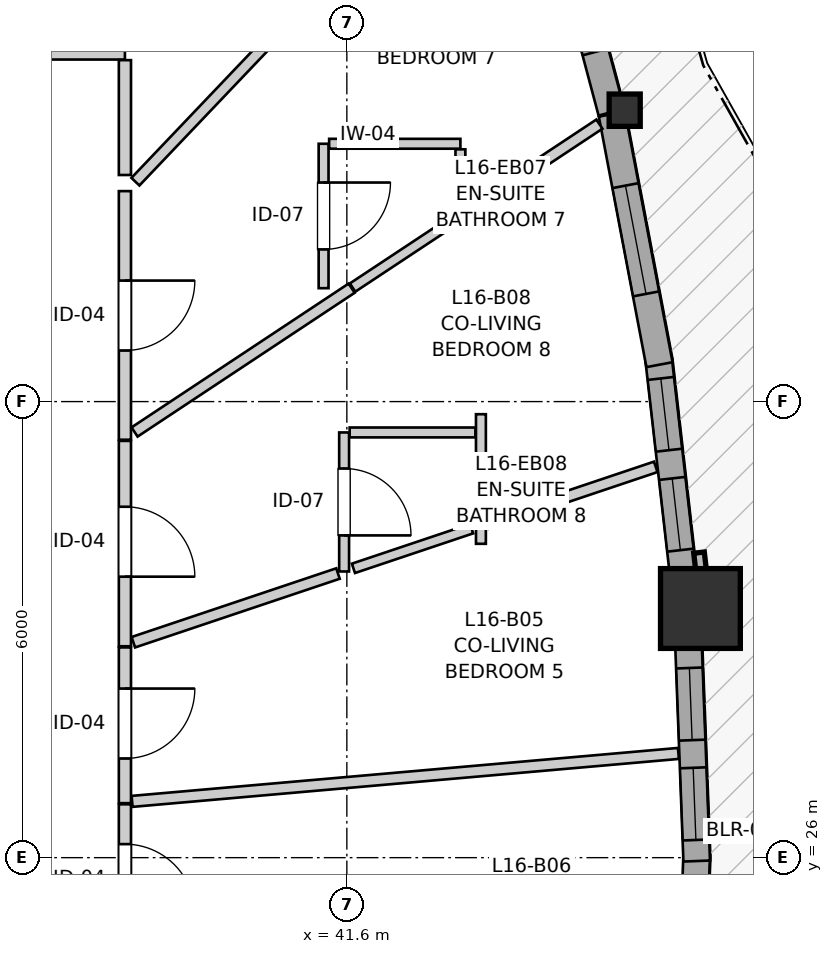
"""IFC4 building model, lengths in metres.
Left out: names, types, materials, properties, quantities, classifications, styles, units other than length and angle.
Written with IfcOpenShell. Run it as: python <this file> out.ifc"""

import sys

from ifc_helpers import new_model, si_unit, direction, frame, frame_2d, origin, origin_2d, place, context, subcontext, project, spatial, rectangle, i_section, extrude, source, transform, mapped, element, fill, save


model = new_model("IFC4")
c1 = context("Model", 3, precision=1e-05, world=origin(), true_north=direction((0.0, 1.0)))
c2 = subcontext(c1, "Body", "Model", "MODEL_VIEW")
j1 = project(units=[si_unit("LENGTHUNIT", "METRE"), si_unit("PLANEANGLEUNIT", "RADIAN")], contexts=[c1])
p1 = place(None, origin())
s1 = spatial("IfcSite", under=j1, at=p1, CompositionType="ELEMENT")
p2 = place(p1, origin())
s2 = spatial("IfcBuilding", under=s1, at=p2, CompositionType="ELEMENT")
p3 = place(p2, frame((0.0, 0.0, 55.8)))
s3 = spatial("IfcBuildingStorey", under=s2, at=p3, CompositionType="ELEMENT", Elevation=55.8)
m1 = source(origin(), c2, "Body", "SweptSolid", [
    extrude(rectangle(XDim=1.05, YDim=1.05, at=origin_2d()), origin(), (0.0, 0.0, 1.0), 2.94),
])
p4 = place(p3, frame((46.252, 29.278, 0.0), z_axis=(0.0, 0.0, 1.0), x_axis=(1.0, 0.0, 0.0)))
e1 = element("IfcColumn", 1, at=p4, inside=s3, PredefinedType="COLUMN", context=c2, shape_type="MappedRepresentation", body=[
    mapped(m1, transform((0.0, 0.0, 0.0), x_axis=(1.0, 0.0, 0.0), y_axis=(0.0, 1.0, 0.0), z_axis=(0.0, 0.0, 1.0), scale=1.0)),
])
m2 = source(origin(), c2, "Body", "SweptSolid", [
    extrude(i_section(OverallWidth=0.409, OverallDepth=0.425, WebThickness=0.03, FlangeThickness=0.048, FilletRadius=0.015, at=origin_2d()), origin(), (0.0, 0.0, 1.0), 2.94),
])
p5 = place(p3, frame((45.256, 35.834, 0.0), z_axis=(0.0, 0.0, 1.0), x_axis=(1.0, 0.0, 0.0)))
e2 = element("IfcColumn", 2, at=p5, inside=s3, PredefinedType="PILASTER", context=c2, shape_type="MappedRepresentation", body=[
    mapped(m2, transform((0.0, 0.0, 0.0), x_axis=(1.0, 0.0, 0.0), y_axis=(0.0, 1.0, 0.0), z_axis=(0.0, 0.0, 1.0), scale=1.0)),
])
p6 = place(p3, frame((46.078, 22.749, 0.0), z_axis=(0.0, 0.0, 1.0), x_axis=(0.037972593677, 0.999278780986, 0.0)))
e3 = element("IfcWall", 3, at=p6, inside=s3, PredefinedType="SOLIDWALL", context=c2, shape_type="SweptSolid", body=[
    extrude(rectangle(XDim=3.298, YDim=0.35, at=frame_2d((1.649, 0.0))), origin(), (0.0, 0.0, 1.0), 2.42),
])
p7 = place(p6, frame((1.394, 0.0, 0.82)))
e4 = element("IfcOpeningElement", 4, at=p7, cuts=e3, PredefinedType="OPENING", context=c2, shape_type="SweptSolid", body=[
    extrude(rectangle(XDim=1.25, YDim=1.35, at=frame_2d((0.625, 0.675))), frame((0.0, 0.185, 0.0), z_axis=(0.0, -1.0, 0.0), x_axis=(1.0, 0.0, 0.0)), (0.0, 0.0, 1.0), 0.37),
])
p8 = place(p3, frame((46.203, 25.955, 0.0), z_axis=(0.0, 0.0, 1.0), x_axis=(-0.038016855762, 0.999277098045, 0.0)))
e5 = element("IfcWall", 5, at=p8, inside=s3, PredefinedType="SOLIDWALL", context=c2, shape_type="SweptSolid", body=[
    extrude(rectangle(XDim=3.018, YDim=0.35, at=frame_2d((1.509, 0.0))), origin(), (0.0, 0.0, 1.0), 2.42),
])
p9 = place(p8, frame((0.277, 0.0, 0.82)))
e6 = element("IfcOpeningElement", 6, at=p9, cuts=e5, PredefinedType="OPENING", context=c2, shape_type="SweptSolid", body=[
    extrude(rectangle(XDim=0.95, YDim=1.35, at=frame_2d((0.475, 0.675))), frame((0.0, 0.185, 0.0), z_axis=(0.0, -1.0, 0.0), x_axis=(1.0, 0.0, 0.0)), (0.0, 0.0, 1.0), 0.37),
])
p10 = place(p8, frame((1.592, 0.0, 0.82)))
e7 = element("IfcOpeningElement", 7, at=p10, cuts=e5, PredefinedType="OPENING", context=c2, shape_type="SweptSolid", body=[
    extrude(rectangle(XDim=0.95, YDim=1.35, at=frame_2d((0.475, 0.675))), frame((0.0, 0.185, 0.0), z_axis=(0.0, -1.0, 0.0), x_axis=(1.0, 0.0, 0.0)), (0.0, 0.0, 1.0), 0.37),
])
p11 = place(p3, frame((46.044, 29.556, 0.0), z_axis=(0.0, 0.0, 1.0), x_axis=(-0.113263196818, 0.993565019637, 0.0)))
e8 = element("IfcWall", 8, at=p11, inside=s3, PredefinedType="SOLIDWALL", context=c2, shape_type="SweptSolid", body=[
    extrude(rectangle(XDim=3.037, YDim=0.35, at=frame_2d((1.519, 0.0))), origin(), (0.0, 0.0, 1.0), 2.42),
])
p12 = place(p11, frame((0.492, 0.0, 0.82)))
e9 = element("IfcOpeningElement", 9, at=p12, cuts=e8, PredefinedType="OPENING", context=c2, shape_type="SweptSolid", body=[
    extrude(rectangle(XDim=0.95, YDim=1.35, at=frame_2d((0.475, 0.675))), frame((0.0, 0.185, 0.0), z_axis=(0.0, -1.0, 0.0), x_axis=(1.0, 0.0, 0.0)), (0.0, 0.0, 1.0), 0.37),
])
p13 = place(p11, frame((1.816, 0.0, 0.82)))
e10 = element("IfcOpeningElement", 10, at=p13, cuts=e8, PredefinedType="OPENING", context=c2, shape_type="SweptSolid", body=[
    extrude(rectangle(XDim=0.95, YDim=1.35, at=frame_2d((0.475, 0.675))), frame((0.0, 0.185, 0.0), z_axis=(0.0, -1.0, 0.0), x_axis=(1.0, 0.0, 0.0)), (0.0, 0.0, 1.0), 0.37),
])
p14 = place(p3, frame((45.713, 32.486, 0.0), z_axis=(0.0, 0.0, 1.0), x_axis=(-0.186603748992, 0.982435260392, 0.0)))
e11 = element("IfcWall", 11, at=p14, inside=s3, PredefinedType="SOLIDWALL", context=c2, shape_type="SweptSolid", body=[
    extrude(rectangle(XDim=3.354, YDim=0.35, at=frame_2d((1.677, 0.0))), origin(), (0.0, 0.0, 1.0), 2.42),
])
p15 = place(p14, frame((0.948, 0.0, 0.82)))
e12 = element("IfcOpeningElement", 12, at=p15, cuts=e11, PredefinedType="OPENING", context=c2, shape_type="SweptSolid", body=[
    extrude(rectangle(XDim=1.45, YDim=1.25, at=frame_2d((0.725, 0.625))), frame((0.0, 0.185, 0.0), z_axis=(0.0, -1.0, 0.0), x_axis=(1.0, 0.0, 0.0)), (0.0, 0.0, 1.0), 0.37),
])
p16 = place(p3, frame((45.081, 35.808, 0.0), z_axis=(0.0, 0.0, 1.0), x_axis=(-0.257114470429, 0.966380954436, 0.0)))
e13 = element("IfcWall", 13, at=p16, inside=s3, PredefinedType="SOLIDWALL", context=c2, shape_type="SweptSolid", body=[
    extrude(rectangle(XDim=3.41, YDim=0.35, at=frame_2d((1.705, 0.0))), origin(), (0.0, 0.0, 1.0), 2.42),
])
p17 = place(p16, frame((0.82, 0.0, 0.82)))
e14 = element("IfcOpeningElement", 14, at=p17, cuts=e13, PredefinedType="OPENING", context=c2, shape_type="SweptSolid", body=[
    extrude(rectangle(XDim=1.75, YDim=1.3, at=frame_2d((0.875, 0.65))), frame((0.0, 0.185, 0.0), z_axis=(0.0, -1.0, 0.0), x_axis=(1.0, 0.0, 0.0)), (0.0, 0.0, 1.0), 0.37),
])
p18 = place(p3, frame((35.011, 36.58, 0.0), z_axis=(0.0, 0.0, 1.0), x_axis=(1.0, 0.0, 0.0)))
e15 = element("IfcWall", 15, at=p18, inside=s3, PredefinedType="PARTITIONING", context=c2, shape_type="SweptSolid", body=[
    extrude(rectangle(XDim=3.669, YDim=0.16, at=frame_2d((1.834, 0.0))), origin(), (0.0, 0.0, 1.0), 2.94),
])
p19 = place(p18, frame((1.363, 0.0, 0.0)))
e16 = element("IfcOpeningElement", 16, at=p19, cuts=e15, PredefinedType="OPENING", context=c2, shape_type="SweptSolid", body=[
    extrude(rectangle(XDim=0.96, YDim=2.1, at=frame_2d((0.48, 1.05))), frame((0.0, 0.09, 0.0), z_axis=(0.0, -1.0, 0.0), x_axis=(1.0, 0.0, 0.0)), (0.0, 0.0, 1.0), 0.18),
])
p20 = place(p3, frame((38.68, 34.769, 0.0), z_axis=(0.0, 0.0, 1.0), x_axis=(0.0, -1.0, 0.0)))
e17 = element("IfcWall", 17, at=p20, inside=s3, PredefinedType="PARTITIONING", context=c2, shape_type="SweptSolid", body=[
    extrude(rectangle(XDim=3.271, YDim=0.16, at=frame_2d((1.635, 0.0))), origin(), (0.0, 0.0, 1.0), 2.94),
])
p21 = place(p20, frame((1.177, 0.0, 0.0)))
e18 = element("IfcOpeningElement", 18, at=p21, cuts=e17, PredefinedType="OPENING", context=c2, shape_type="SweptSolid", body=[
    extrude(rectangle(XDim=0.92, YDim=2.1, at=frame_2d((0.46, 1.05))), frame((0.0, 0.09, 0.0), z_axis=(0.0, -1.0, 0.0), x_axis=(1.0, 0.0, 0.0)), (0.0, 0.0, 1.0), 0.18),
])
p22 = place(p3, frame((38.68, 31.483, 0.0), z_axis=(0.0, 0.0, 1.0), x_axis=(0.0, -1.0, 0.0)))
e19 = element("IfcWall", 19, at=p22, inside=s3, PredefinedType="PARTITIONING", context=c2, shape_type="SweptSolid", body=[
    extrude(rectangle(XDim=2.702, YDim=0.16, at=frame_2d((1.351, 0.0))), origin(), (0.0, 0.0, 1.0), 2.94),
])
p23 = place(p22, frame((0.866, 0.0, 0.0)))
e20 = element("IfcOpeningElement", 20, at=p23, cuts=e19, PredefinedType="OPENING", context=c2, shape_type="SweptSolid", body=[
    extrude(rectangle(XDim=0.92, YDim=2.1, at=frame_2d((0.46, 1.05))), frame((0.0, 0.09, 0.0), z_axis=(0.0, -1.0, 0.0), x_axis=(1.0, 0.0, 0.0)), (0.0, 0.0, 1.0), 0.18),
])
p24 = place(p3, frame((38.68, 28.766, 0.0), z_axis=(0.0, 0.0, 1.0), x_axis=(0.0, -1.0, 0.0)))
e21 = element("IfcWall", 21, at=p24, inside=s3, PredefinedType="PARTITIONING", context=c2, shape_type="SweptSolid", body=[
    extrude(rectangle(XDim=2.049, YDim=0.16, at=frame_2d((1.024, 0.0))), origin(), (0.0, 0.0, 1.0), 2.94),
])
p25 = place(p24, frame((0.542, 0.0, 0.0)))
e22 = element("IfcOpeningElement", 22, at=p25, cuts=e21, PredefinedType="OPENING", context=c2, shape_type="SweptSolid", body=[
    extrude(rectangle(XDim=0.92, YDim=2.1, at=frame_2d((0.46, 1.05))), frame((0.0, 0.09, 0.0), z_axis=(0.0, -1.0, 0.0), x_axis=(1.0, 0.0, 0.0)), (0.0, 0.0, 1.0), 0.18),
])
p26 = place(p3, frame((38.68, 26.702, 0.0), z_axis=(0.0, 0.0, 1.0), x_axis=(0.0, -1.0, 0.0)))
e23 = element("IfcWall", 23, at=p26, inside=s3, PredefinedType="PARTITIONING", context=c2, shape_type="SweptSolid", body=[
    extrude(rectangle(XDim=1.967, YDim=0.16, at=frame_2d((0.983, 0.0))), origin(), (0.0, 0.0, 1.0), 2.94),
])
p27 = place(p26, frame((0.524, 0.0, 0.0)))
e24 = element("IfcOpeningElement", 24, at=p27, cuts=e23, PredefinedType="OPENING", context=c2, shape_type="SweptSolid", body=[
    extrude(rectangle(XDim=0.92, YDim=2.1, at=frame_2d((0.46, 1.05))), frame((0.0, 0.09, 0.0), z_axis=(0.0, -1.0, 0.0), x_axis=(1.0, 0.0, 0.0)), (0.0, 0.0, 1.0), 0.18),
])
p28 = place(p3, frame((41.294, 35.392, 0.0), z_axis=(0.0, 0.0, 1.0), x_axis=(0.0, -1.0, 0.0)))
e25 = element("IfcWall", 25, at=p28, inside=s3, PredefinedType="PARTITIONING", context=c2, shape_type="SweptSolid", body=[
    extrude(rectangle(XDim=1.9, YDim=0.13, at=frame_2d((0.95, 0.0))), origin(), (0.0, 0.0, 1.0), 2.94),
])
p29 = place(p28, frame((0.51, 0.0, 0.0)))
e26 = element("IfcOpeningElement", 26, at=p29, cuts=e25, PredefinedType="OPENING", context=c2, shape_type="SweptSolid", body=[
    extrude(rectangle(XDim=0.88, YDim=2.05, at=frame_2d((0.44, 1.025))), frame((0.0, 0.075, 0.0), z_axis=(0.0, -1.0, 0.0), x_axis=(1.0, 0.0, 0.0)), (0.0, 0.0, 1.0), 0.15),
])
p30 = place(p3, frame((41.564, 31.594, 0.0), z_axis=(0.0, 0.0, 1.0), x_axis=(0.0, -1.0, 0.0)))
e27 = element("IfcWall", 27, at=p30, inside=s3, PredefinedType="PARTITIONING", context=c2, shape_type="SweptSolid", body=[
    extrude(rectangle(XDim=1.829, YDim=0.13, at=frame_2d((0.915, 0.0))), origin(), (0.0, 0.0, 1.0), 2.94),
])
p31 = place(p30, frame((0.475, 0.0, 0.0)))
e28 = element("IfcOpeningElement", 28, at=p31, cuts=e27, PredefinedType="OPENING", context=c2, shape_type="SweptSolid", body=[
    extrude(rectangle(XDim=0.88, YDim=2.05, at=frame_2d((0.44, 1.025))), frame((0.0, 0.075, 0.0), z_axis=(0.0, -1.0, 0.0), x_axis=(1.0, 0.0, 0.0)), (0.0, 0.0, 1.0), 0.15),
])
p32 = place(p3, frame((38.774, 26.74, 0.0), z_axis=(0.0, 0.0, 1.0), x_axis=(0.99617095107, 0.087426747871, 0.0)))
e29 = element("IfcWall", 29, at=p32, inside=s3, PredefinedType="PARTITIONING", context=c2, shape_type="SweptSolid", body=[
    extrude(rectangle(XDim=7.216, YDim=0.145, at=frame_2d((3.608, 0.0))), origin(), (0.0, 0.0, 1.0), 2.94),
])
p33 = place(p3, frame((38.818, 34.893, 0.0), z_axis=(0.0, 0.0, 1.0), x_axis=(0.68961378572, 0.724177344678, 0.0)))
e30 = element("IfcWall", 30, at=p33, inside=s3, PredefinedType="PARTITIONING", context=c2, shape_type="SweptSolid", body=[
    extrude(rectangle(XDim=7.071, YDim=0.145, at=frame_2d((3.535, 0.0))), origin(), (0.0, 0.0, 1.0), 2.94),
])
p34 = place(p3, frame((38.807, 31.6, 0.0), z_axis=(0.0, 0.0, 1.0), x_axis=(0.833690999351, 0.552231217518, 0.0)))
e31 = element("IfcWall", 31, at=p34, inside=s3, PredefinedType="PARTITIONING", context=c2, shape_type="SweptSolid", body=[
    extrude(rectangle(XDim=3.426, YDim=0.145, at=frame_2d((1.713, 0.0))), origin(), (0.0, 0.0, 1.0), 2.94),
])
p35 = place(p3, frame((38.791, 28.834, 0.0), z_axis=(0.0, 0.0, 1.0), x_axis=(0.94801935148, 0.318212679226, 0.0)))
e32 = element("IfcWall", 32, at=p35, inside=s3, PredefinedType="PARTITIONING", context=c2, shape_type="SweptSolid", body=[
    extrude(rectangle(XDim=2.84, YDim=0.145, at=frame_2d((1.42, 0.0))), origin(), (0.0, 0.0, 1.0), 2.94),
])
p36 = place(p3, frame((43.445, 30.396, 0.0), z_axis=(0.0, 0.0, 1.0), x_axis=(0.947971837268, 0.318354198568, 0.0)))
e33 = element("IfcWall", 33, at=p36, inside=s3, PredefinedType="PARTITIONING", context=c2, shape_type="SweptSolid", body=[
    extrude(rectangle(XDim=2.341, YDim=0.145, at=frame_2d((1.171, 0.0))), origin(), (0.0, 0.0, 1.0), 2.94),
])
p37 = place(p3, frame((43.094, 34.439, 0.0), z_axis=(0.0, 0.0, 1.0), x_axis=(0.833690342454, 0.552232209219, 0.0)))
e34 = element("IfcWall", 34, at=p37, inside=s3, PredefinedType="PARTITIONING", context=c2, shape_type="SweptSolid", body=[
    extrude(rectangle(XDim=2.194, YDim=0.145, at=frame_2d((1.097, 0.0))), origin(), (0.0, 0.0, 1.0), 2.94),
])
p38 = place(p3, frame((41.687, 29.806, 0.0), z_axis=(0.0, 0.0, 1.0), x_axis=(0.948056253842, 0.318102718553, 0.0)))
e35 = element("IfcWall", 35, at=p38, inside=s3, PredefinedType="PARTITIONING", context=c2, shape_type="SweptSolid", body=[
    extrude(rectangle(XDim=1.64, YDim=0.13, at=frame_2d((0.82, 0.0))), origin(), (0.0, 0.0, 1.0), 2.94),
])
p39 = place(p3, frame((41.367, 35.392, 0.0), z_axis=(0.0, 0.0, 1.0), x_axis=(1.0, 0.0, 0.0)))
e36 = element("IfcWall", 36, at=p39, inside=s3, PredefinedType="PARTITIONING", context=c2, shape_type="SweptSolid", body=[
    extrude(rectangle(XDim=1.727, YDim=0.13, at=frame_2d((0.864, 0.0))), origin(), (0.0, 0.0, 1.0), 2.94),
])
p40 = place(p3, frame((41.637, 31.594, 0.0), z_axis=(0.0, 0.0, 1.0), x_axis=(1.0, 0.0, 0.0)))
e37 = element("IfcWall", 37, at=p40, inside=s3, PredefinedType="PARTITIONING", context=c2, shape_type="SweptSolid", body=[
    extrude(rectangle(XDim=1.654, YDim=0.13, at=frame_2d((0.827, 0.0))), origin(), (0.0, 0.0, 1.0), 2.94),
])
p41 = place(p3, frame((38.68, 34.981, 0.0), z_axis=(0.0, 0.0, 1.0), x_axis=(0.0, 1.0, 0.0)))
e38 = element("IfcWall", 38, at=p41, inside=s3, PredefinedType="PARTITIONING", context=c2, shape_type="SweptSolid", body=[
    extrude(rectangle(XDim=1.511, YDim=0.16, at=frame_2d((0.755, 0.0))), origin(), (0.0, 0.0, 1.0), 2.94),
])
p42 = place(p3, frame((41.676, 33.5, 0.0), z_axis=(0.0, 0.0, 1.0), x_axis=(0.833939065936, 0.55185653417, 0.0)))
e39 = element("IfcWall", 39, at=p42, inside=s3, PredefinedType="PARTITIONING", context=c2, shape_type="SweptSolid", body=[
    extrude(rectangle(XDim=1.686, YDim=0.13, at=frame_2d((0.843, 0.0))), origin(), (0.0, 0.0, 1.0), 2.94),
])
p43 = place(p3, frame((43.364, 30.129, 0.0), z_axis=(0.0, 0.0, 1.0), x_axis=(0.0, 1.0, 0.0)))
e40 = element("IfcWall", 40, at=p43, inside=s3, PredefinedType="PARTITIONING", context=c2, shape_type="SweptSolid", body=[
    extrude(rectangle(XDim=1.705, YDim=0.13, at=frame_2d((0.853, 0.0))), origin(), (0.0, 0.0, 1.0), 2.94),
])
p44 = place(p3, frame((43.094, 34.577, 0.0), z_axis=(0.0, 0.0, 1.0), x_axis=(0.0, 1.0, 0.0)))
e41 = element("IfcWall", 41, at=p44, inside=s3, PredefinedType="PARTITIONING", context=c2, shape_type="SweptSolid", body=[
    extrude(rectangle(XDim=0.742, YDim=0.13, at=frame_2d((0.371, 0.0))), origin(), (0.0, 0.0, 1.0), 2.94),
])
m3 = source(origin(), c2, "Body", "SweptSolid", [
    extrude(rectangle(XDim=0.95, YDim=1.35, at=frame_2d((0.475, 0.675))), frame((0.0, 0.03, 0.0), z_axis=(0.0, -1.0, 0.0), x_axis=(1.0, 0.0, 0.0)), (0.0, 0.0, 1.0), 0.06),
])
p45 = place(p9, origin())
e42 = element("IfcWindow", 42, at=p45, inside=s3, PartitioningType="SINGLE_PANEL", PredefinedType="WINDOW", context=c2, shape_type="MappedRepresentation", body=[
    mapped(m3, transform((0.0, 0.0, 0.0), x_axis=(1.0, 0.0, 0.0), y_axis=(0.0, 1.0, 0.0), z_axis=(0.0, 0.0, 1.0), scale=1.0)),
])
fill(e6, e42)
p46 = place(p10, origin())
e43 = element("IfcWindow", 43, at=p46, inside=s3, PartitioningType="SINGLE_PANEL", PredefinedType="WINDOW", context=c2, shape_type="MappedRepresentation", body=[
    mapped(m3, transform((0.0, 0.0, 0.0), x_axis=(1.0, 0.0, 0.0), y_axis=(0.0, 1.0, 0.0), z_axis=(0.0, 0.0, 1.0), scale=1.0)),
])
fill(e7, e43)
p47 = place(p12, origin())
e44 = element("IfcWindow", 44, at=p47, inside=s3, PartitioningType="SINGLE_PANEL", PredefinedType="WINDOW", context=c2, shape_type="MappedRepresentation", body=[
    mapped(m3, transform((0.0, 0.0, 0.0), x_axis=(1.0, 0.0, 0.0), y_axis=(0.0, 1.0, 0.0), z_axis=(0.0, 0.0, 1.0), scale=1.0)),
])
fill(e9, e44)
p48 = place(p13, origin())
e45 = element("IfcWindow", 45, at=p48, inside=s3, PartitioningType="SINGLE_PANEL", PredefinedType="WINDOW", context=c2, shape_type="MappedRepresentation", body=[
    mapped(m3, transform((0.0, 0.0, 0.0), x_axis=(1.0, 0.0, 0.0), y_axis=(0.0, 1.0, 0.0), z_axis=(0.0, 0.0, 1.0), scale=1.0)),
])
fill(e10, e45)
m4 = source(origin(), c2, "Body", "SweptSolid", [
    extrude(rectangle(XDim=1.45, YDim=1.25, at=frame_2d((0.725, 0.625))), frame((0.0, 0.03, 0.0), z_axis=(0.0, -1.0, 0.0), x_axis=(1.0, 0.0, 0.0)), (0.0, 0.0, 1.0), 0.06),
])
p49 = place(p15, origin())
e46 = element("IfcWindow", 46, at=p49, inside=s3, PartitioningType="SINGLE_PANEL", PredefinedType="WINDOW", context=c2, shape_type="MappedRepresentation", body=[
    mapped(m4, transform((0.0, 0.0, 0.0), x_axis=(1.0, 0.0, 0.0), y_axis=(0.0, 1.0, 0.0), z_axis=(0.0, 0.0, 1.0), scale=1.0)),
])
fill(e12, e46)
m5 = source(origin(), c2, "Body", "SweptSolid", [
    extrude(rectangle(XDim=1.75, YDim=1.3, at=frame_2d((0.875, 0.65))), frame((0.0, 0.03, 0.0), z_axis=(0.0, -1.0, 0.0), x_axis=(1.0, 0.0, 0.0)), (0.0, 0.0, 1.0), 0.06),
])
p50 = place(p17, origin())
e47 = element("IfcWindow", 47, at=p50, inside=s3, PartitioningType="SINGLE_PANEL", PredefinedType="WINDOW", context=c2, shape_type="MappedRepresentation", body=[
    mapped(m5, transform((0.0, 0.0, 0.0), x_axis=(1.0, 0.0, 0.0), y_axis=(0.0, 1.0, 0.0), z_axis=(0.0, 0.0, 1.0), scale=1.0)),
])
fill(e14, e47)
m6 = source(origin(), c2, "Body", "SweptSolid", [
    extrude(rectangle(XDim=0.92, YDim=2.1, at=frame_2d((0.46, 1.05))), frame((0.0, 0.025, 0.0), z_axis=(0.0, -1.0, 0.0), x_axis=(1.0, 0.0, 0.0)), (0.0, 0.0, 1.0), 0.05),
])
p51 = place(p21, origin())
e48 = element("IfcDoor", 48, at=p51, inside=s3, OperationType="SINGLE_SWING_LEFT", PredefinedType="DOOR", context=c2, shape_type="MappedRepresentation", body=[
    mapped(m6, transform((0.0, 0.0, 0.0), x_axis=(1.0, 0.0, 0.0), y_axis=(0.0, 1.0, 0.0), z_axis=(0.0, 0.0, 1.0), scale=1.0)),
])
fill(e18, e48)
p52 = place(p23, origin())
e49 = element("IfcDoor", 49, at=p52, inside=s3, OperationType="SINGLE_SWING_RIGHT", PredefinedType="DOOR", context=c2, shape_type="MappedRepresentation", body=[
    mapped(m6, transform((0.0, 0.0, 0.0), x_axis=(1.0, 0.0, 0.0), y_axis=(0.0, 1.0, 0.0), z_axis=(0.0, 0.0, 1.0), scale=1.0)),
])
fill(e20, e49)
p53 = place(p25, origin())
e50 = element("IfcDoor", 50, at=p53, inside=s3, OperationType="SINGLE_SWING_LEFT", PredefinedType="DOOR", context=c2, shape_type="MappedRepresentation", body=[
    mapped(m6, transform((0.0, 0.0, 0.0), x_axis=(1.0, 0.0, 0.0), y_axis=(0.0, 1.0, 0.0), z_axis=(0.0, 0.0, 1.0), scale=1.0)),
])
fill(e22, e50)
p54 = place(p27, origin())
e51 = element("IfcDoor", 51, at=p54, inside=s3, OperationType="SINGLE_SWING_RIGHT", PredefinedType="DOOR", context=c2, shape_type="MappedRepresentation", body=[
    mapped(m6, transform((0.0, 0.0, 0.0), x_axis=(1.0, 0.0, 0.0), y_axis=(0.0, 1.0, 0.0), z_axis=(0.0, 0.0, 1.0), scale=1.0)),
])
fill(e24, e51)
m7 = source(origin(), c2, "Body", "SweptSolid", [
    extrude(rectangle(XDim=0.88, YDim=2.05, at=frame_2d((0.44, 1.025))), frame((0.0, 0.025, 0.0), z_axis=(0.0, -1.0, 0.0), x_axis=(1.0, 0.0, 0.0)), (0.0, 0.0, 1.0), 0.05),
])
p55 = place(p29, origin())
e52 = element("IfcDoor", 52, at=p55, inside=s3, OperationType="SINGLE_SWING_LEFT", PredefinedType="DOOR", context=c2, shape_type="MappedRepresentation", body=[
    mapped(m7, transform((0.0, 0.0, 0.0), x_axis=(1.0, 0.0, 0.0), y_axis=(0.0, 1.0, 0.0), z_axis=(0.0, 0.0, 1.0), scale=1.0)),
])
fill(e26, e52)
p56 = place(p31, origin())
e53 = element("IfcDoor", 53, at=p56, inside=s3, OperationType="SINGLE_SWING_RIGHT", PredefinedType="DOOR", context=c2, shape_type="MappedRepresentation", body=[
    mapped(m7, transform((0.0, 0.0, 0.0), x_axis=(1.0, 0.0, 0.0), y_axis=(0.0, 1.0, 0.0), z_axis=(0.0, 0.0, 1.0), scale=1.0)),
])
fill(e28, e53)
save(model, sys.argv[1])
